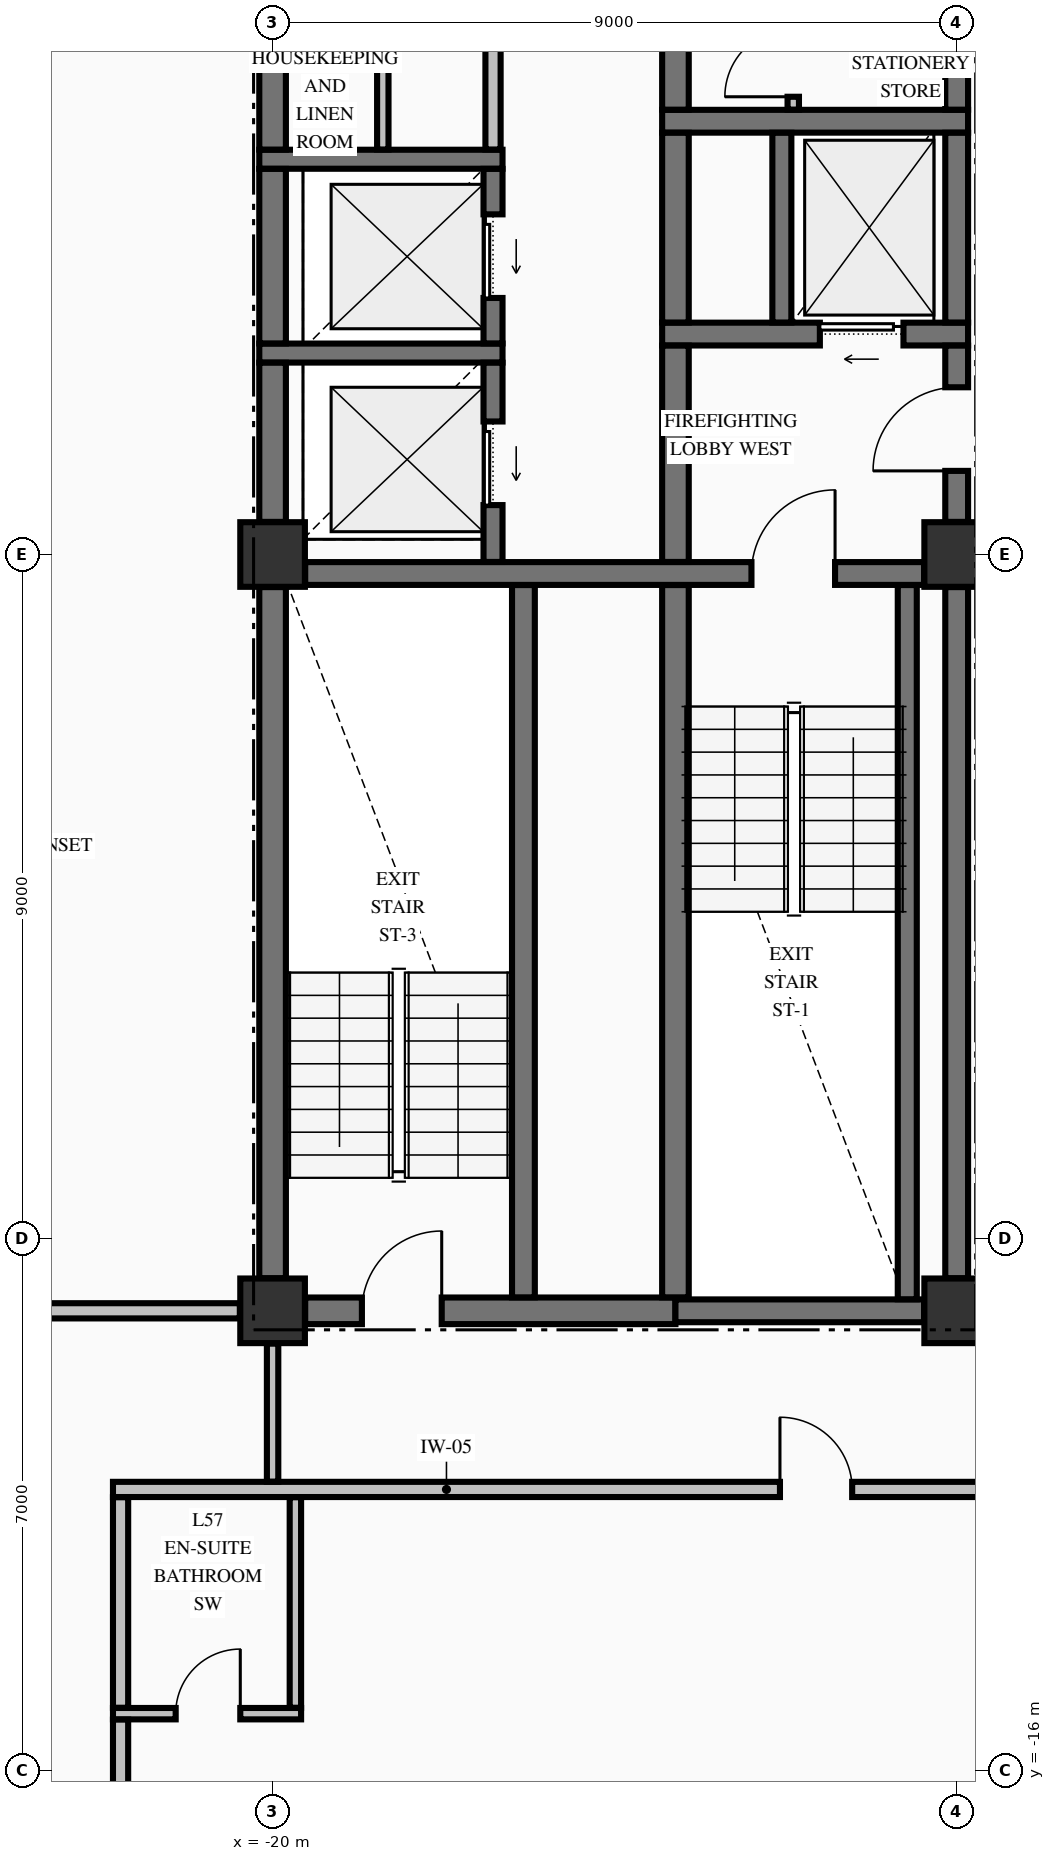
"""IFC4 building model, lengths in metres.
Left out: names, types, materials, properties, quantities, classifications, styles, units other than length and angle.
Written with IfcOpenShell. Run it as: python <this file> out.ifc"""

import sys

from ifc_helpers import new_model, si_unit, direction, frame, frame_2d, origin, origin_2d, place, context, subcontext, project, spatial, rectangle, extrude, element, fill, save


model = new_model("IFC4")
c1 = context("Model", 3, precision=1e-05, world=origin(), true_north=direction((0.0, 1.0)))
c2 = subcontext(c1, "Body", "Model", "MODEL_VIEW")
j1 = project(units=[si_unit("LENGTHUNIT", "METRE"), si_unit("PLANEANGLEUNIT", "RADIAN")], contexts=[c1])
p1 = place(None, origin())
s1 = spatial("IfcSite", under=j1, at=p1, CompositionType="ELEMENT")
p2 = place(p1, origin())
s2 = spatial("IfcBuilding", under=s1, at=p2, CompositionType="ELEMENT")
p3 = place(p2, frame((0.0, 0.0, 218.66)))
s3 = spatial("IfcBuildingStorey", under=s2, at=p3, CompositionType="ELEMENT", Elevation=218.66)
for number, where, z_axis, x_axis in (
    (1, (-20.0, -9.95, -0.25), (0.0, 0.0, 1.0), (1.0, 0.0, 0.0)),
    (2, (-11.0, -9.95, -0.25), (0.0, 0.0, 1.0), (1.0, 0.0, 0.0)),
    (3, (-11.0, 0.0, -0.25), (0.0, 0.0, 1.0), (1.0, 0.0, 0.0)),
    (4, (-20.0, 0.0, -0.25), (0.0, 0.0, 1.0), (1.0, 0.0, 0.0)),
):
    element("IfcColumn", number, at=place(p3, frame(where, z_axis=z_axis, x_axis=x_axis)), inside=s3, PredefinedType="COLUMN", context=c2, shape_type="SweptSolid", body=[
        extrude(rectangle(XDim=0.85, YDim=0.85, at=origin_2d()), origin(), (0.0, 0.0, 1.0), 3.225),
    ])
p4 = place(p3, frame((-19.571, -9.95, 0.0), z_axis=(0.0, 0.0, 1.0), x_axis=(1.0, 0.0, 0.0)))
e5 = element("IfcWall", 5, at=p4, inside=s3, PredefinedType="SHEAR", context=c2, shape_type="SweptSolid", body=[
    extrude(rectangle(XDim=4.871, YDim=0.35, at=frame_2d((2.436, 0.0))), origin(), (0.0, 0.0, 1.0), 2.975),
])
p5 = place(p4, frame((0.746, 0.0, 0.0)))
e6 = element("IfcOpeningElement", 6, at=p5, cuts=e5, PredefinedType="OPENING", context=c2, shape_type="SweptSolid", body=[
    extrude(rectangle(XDim=1.05, YDim=2.15, at=frame_2d((0.525, 1.075))), frame((0.0, 0.185, 0.0), z_axis=(0.0, -1.0, 0.0), x_axis=(1.0, 0.0, 0.0)), (0.0, 0.0, 1.0), 0.37),
])
p6 = place(p3, frame((-14.7, -9.95, 0.0), z_axis=(0.0, 0.0, 1.0), x_axis=(1.0, 0.0, 0.0)))
e7 = element("IfcWall", 7, at=p6, inside=s3, PredefinedType="SHEAR", context=c2, shape_type="SweptSolid", body=[
    extrude(rectangle(XDim=3.271, YDim=0.3, at=frame_2d((1.635, 0.0))), origin(), (0.0, 0.0, 1.0), 2.975),
])
p7 = place(p3, frame((-19.571, -0.25, 0.0), z_axis=(0.0, 0.0, 1.0), x_axis=(1.0, 0.0, 0.0)))
e8 = element("IfcWall", 8, at=p7, inside=s3, PredefinedType="SHEAR", context=c2, shape_type="SweptSolid", body=[
    extrude(rectangle(XDim=8.142, YDim=0.3, at=frame_2d((4.071, 0.0))), origin(), (0.0, 0.0, 1.0), 2.975),
])
p8 = place(p7, frame((5.871, 0.0, 0.0)))
e9 = element("IfcOpeningElement", 9, at=p8, cuts=e8, PredefinedType="OPENING", context=c2, shape_type="SweptSolid", body=[
    extrude(rectangle(XDim=1.1, YDim=2.15, at=frame_2d((0.55, 1.075))), frame((0.0, 0.16, 0.0), z_axis=(0.0, -1.0, 0.0), x_axis=(1.0, 0.0, 0.0)), (0.0, 0.0, 1.0), 0.32),
])
p9 = place(p3, frame((-20.175, 2.65, 0.0), z_axis=(0.0, 0.0, 1.0), x_axis=(1.0, 0.0, 0.0)))
e10 = element("IfcWall", 10, at=p9, inside=s3, PredefinedType="SOLIDWALL", context=c2, shape_type="SweptSolid", body=[
    extrude(rectangle(XDim=3.2, YDim=0.25, at=frame_2d((1.6, 0.0))), origin(), (0.0, 0.0, 1.0), 2.975),
])
p10 = place(p3, frame((-14.875, 2.9, 0.0), z_axis=(0.0, 0.0, 1.0), x_axis=(1.0, 0.0, 0.0)))
e11 = element("IfcWall", 11, at=p10, inside=s3, PredefinedType="SHEAR", context=c2, shape_type="SweptSolid", body=[
    extrude(rectangle(XDim=4.025, YDim=0.3, at=frame_2d((2.012, 0.0))), origin(), (0.0, 0.0, 1.0), 2.975),
])
p11 = place(p10, frame((2.075, 0.0, 0.0)))
e12 = element("IfcOpeningElement", 12, at=p11, cuts=e11, PredefinedType="OPENING", context=c2, shape_type="SweptSolid", body=[
    extrude(rectangle(XDim=1.1, YDim=2.2, at=frame_2d((0.55, 1.1))), frame((0.0, 0.16, 0.0), z_axis=(0.0, -1.0, 0.0), x_axis=(1.0, 0.0, 0.0)), (0.0, 0.0, 1.0), 0.32),
])
p12 = place(p3, frame((-20.175, 5.2, 0.0), z_axis=(0.0, 0.0, 1.0), x_axis=(1.0, 0.0, 0.0)))
e13 = element("IfcWall", 13, at=p12, inside=s3, PredefinedType="SOLIDWALL", context=c2, shape_type="SweptSolid", body=[
    extrude(rectangle(XDim=3.2, YDim=0.25, at=frame_2d((1.6, 0.0))), origin(), (0.0, 0.0, 1.0), 2.975),
])
p13 = place(p3, frame((-14.875, 5.7, 0.0), z_axis=(0.0, 0.0, 1.0), x_axis=(1.0, 0.0, 0.0)))
e14 = element("IfcWall", 14, at=p13, inside=s3, PredefinedType="SHEAR", context=c2, shape_type="SweptSolid", body=[
    extrude(rectangle(XDim=4.025, YDim=0.3, at=frame_2d((2.012, 0.0))), origin(), (0.0, 0.0, 1.0), 2.975),
])
p14 = place(p3, frame((-22.1, -15.25, 0.0), z_axis=(0.0, 0.0, 1.0), x_axis=(1.0, 0.0, 0.0)))
e15 = element("IfcWall", 15, at=p14, inside=s3, PredefinedType="PARTITIONING", context=c2, shape_type="SweptSolid", body=[
    extrude(rectangle(XDim=2.475, YDim=0.15, at=frame_2d((1.238, 0.0))), origin(), (0.0, 0.0, 1.0), 2.975),
])
p15 = place(p14, frame((0.825, 0.0, 0.0)))
e16 = element("IfcOpeningElement", 16, at=p15, cuts=e15, PredefinedType="OPENING", context=c2, shape_type="SweptSolid", body=[
    extrude(rectangle(XDim=0.85, YDim=2.1, at=frame_2d((0.425, 1.05))), frame((0.0, 0.085, 0.0), z_axis=(0.0, -1.0, 0.0), x_axis=(1.0, 0.0, 0.0)), (0.0, 0.0, 1.0), 0.17),
])
p16 = place(p3, frame((-22.1, -12.3, 0.0), z_axis=(0.0, 0.0, 1.0), x_axis=(1.0, 0.0, 0.0)))
e17 = element("IfcWall", 17, at=p16, inside=s3, PredefinedType="PARTITIONING", context=c2, shape_type="SweptSolid", body=[
    extrude(rectangle(XDim=16.2, YDim=0.2, at=frame_2d((8.1, 0.0))), origin(), (0.0, 0.0, 1.0), 2.975),
])
p17 = place(p16, frame((8.775, 0.0, 0.0)))
e18 = element("IfcOpeningElement", 18, at=p17, cuts=e17, PredefinedType="OPENING", context=c2, shape_type="SweptSolid", body=[
    extrude(rectangle(XDim=0.95, YDim=2.15, at=frame_2d((0.475, 1.075))), frame((0.0, 0.11, 0.0), z_axis=(0.0, -1.0, 0.0), x_axis=(1.0, 0.0, 0.0)), (0.0, 0.0, 1.0), 0.22),
])
p18 = place(p3, frame((-26.835, -9.95, 0.0), z_axis=(0.0, 0.0, 1.0), x_axis=(1.0, 0.0, 0.0)))
e19 = element("IfcWall", 19, at=p18, inside=s3, PredefinedType="PARTITIONING", context=c2, shape_type="SweptSolid", body=[
    extrude(rectangle(XDim=6.404, YDim=0.2, at=frame_2d((3.202, 0.0))), origin(), (0.0, 0.0, 1.0), 2.975),
])
p19 = place(p3, frame((-20.0, -9.521, 0.0), z_axis=(0.0, 0.0, 1.0), x_axis=(0.0, 1.0, 0.0)))
e20 = element("IfcWall", 20, at=p19, inside=s3, PredefinedType="SHEAR", context=c2, shape_type="SweptSolid", body=[
    extrude(rectangle(XDim=9.092, YDim=0.35, at=frame_2d((4.546, 0.0))), origin(), (0.0, 0.0, 1.0), 2.975),
])
p20 = place(p3, frame((-20.0, 0.429, 0.0), z_axis=(0.0, 0.0, 1.0), x_axis=(0.0, 1.0, 0.0)))
e21 = element("IfcWall", 21, at=p20, inside=s3, PredefinedType="SHEAR", context=c2, shape_type="SweptSolid", body=[
    extrude(rectangle(XDim=2.094, YDim=0.35, at=frame_2d((1.047, 0.0))), origin(), (0.0, 0.0, 1.0), 2.975),
])
p21 = place(p3, frame((-20.0, 2.777, 0.0), z_axis=(0.0, 0.0, 1.0), x_axis=(0.0, 1.0, 0.0)))
e22 = element("IfcWall", 22, at=p21, inside=s3, PredefinedType="SHEAR", context=c2, shape_type="SweptSolid", body=[
    extrude(rectangle(XDim=2.296, YDim=0.35, at=frame_2d((1.148, 0.0))), origin(), (0.0, 0.0, 1.0), 2.975),
])
p22 = place(p3, frame((-20.0, 5.327, 0.0), z_axis=(0.0, 0.0, 1.0), x_axis=(0.0, 1.0, 0.0)))
e23 = element("IfcWall", 23, at=p22, inside=s3, PredefinedType="SHEAR", context=c2, shape_type="SweptSolid", body=[
    extrude(rectangle(XDim=4.744, YDim=0.35, at=frame_2d((2.372, 0.0))), origin(), (0.0, 0.0, 1.0), 2.975),
])
p23 = place(p3, frame((-17.1, -0.098, 0.0), z_axis=(0.0, 0.0, 1.0), x_axis=(0.0, 1.0, 0.0)))
e24 = element("IfcWall", 24, at=p23, inside=s3, PredefinedType="SOLIDWALL", context=c2, shape_type="SweptSolid", body=[
    extrude(rectangle(XDim=2.621, YDim=0.25, at=frame_2d((1.311, 0.0))), origin(), (0.0, 0.0, 1.0), 2.975),
])
p24 = place(p23, frame((0.748, 0.0, 0.0)))
e25 = element("IfcOpeningElement", 25, at=p24, cuts=e24, PredefinedType="OPENING", context=c2, shape_type="SweptSolid", body=[
    extrude(rectangle(XDim=1.1, YDim=2.2, at=frame_2d((0.55, 1.1))), frame((0.0, 0.135, 0.0), z_axis=(0.0, -1.0, 0.0), x_axis=(1.0, 0.0, 0.0)), (0.0, 0.0, 1.0), 0.27),
])
p25 = place(p3, frame((-17.1, 2.777, 0.0), z_axis=(0.0, 0.0, 1.0), x_axis=(0.0, 1.0, 0.0)))
e26 = element("IfcWall", 26, at=p25, inside=s3, PredefinedType="SOLIDWALL", context=c2, shape_type="SweptSolid", body=[
    extrude(rectangle(XDim=2.296, YDim=0.25, at=frame_2d((1.148, 0.0))), origin(), (0.0, 0.0, 1.0), 2.975),
])
p26 = place(p25, frame((0.598, 0.0, 0.0)))
e27 = element("IfcOpeningElement", 27, at=p26, cuts=e26, PredefinedType="OPENING", context=c2, shape_type="SweptSolid", body=[
    extrude(rectangle(XDim=1.1, YDim=2.2, at=frame_2d((0.55, 1.1))), frame((0.0, 0.135, 0.0), z_axis=(0.0, -1.0, 0.0), x_axis=(1.0, 0.0, 0.0)), (0.0, 0.0, 1.0), 0.27),
])
p27 = place(p3, frame((-16.7, -9.773, 0.0), z_axis=(0.0, 0.0, 1.0), x_axis=(0.0, 1.0, 0.0)))
e28 = element("IfcWall", 28, at=p27, inside=s3, PredefinedType="SHEAR", context=c2, shape_type="SweptSolid", body=[
    extrude(rectangle(XDim=9.371, YDim=0.3, at=frame_2d((4.686, 0.0))), origin(), (0.0, 0.0, 1.0), 2.975),
])
p28 = place(p3, frame((-14.7, -9.773, 0.0), z_axis=(0.0, 0.0, 1.0), x_axis=(0.0, 1.0, 0.0)))
e29 = element("IfcWall", 29, at=p28, inside=s3, PredefinedType="SHEAR", context=c2, shape_type="SweptSolid", body=[
    extrude(rectangle(XDim=9.371, YDim=0.35, at=frame_2d((4.686, 0.0))), origin(), (0.0, 0.0, 1.0), 2.975),
])
p29 = place(p3, frame((-14.7, -0.098, 0.0), z_axis=(0.0, 0.0, 1.0), x_axis=(0.0, 1.0, 0.0)))
e30 = element("IfcWall", 30, at=p29, inside=s3, PredefinedType="SHEAR", context=c2, shape_type="SweptSolid", body=[
    extrude(rectangle(XDim=2.846, YDim=0.35, at=frame_2d((1.423, 0.0))), origin(), (0.0, 0.0, 1.0), 2.975),
])
p30 = place(p3, frame((-14.7, 3.052, 0.0), z_axis=(0.0, 0.0, 1.0), x_axis=(0.0, 1.0, 0.0)))
e31 = element("IfcWall", 31, at=p30, inside=s3, PredefinedType="SHEAR", context=c2, shape_type="SweptSolid", body=[
    extrude(rectangle(XDim=2.496, YDim=0.35, at=frame_2d((1.248, 0.0))), origin(), (0.0, 0.0, 1.0), 2.975),
])
p31 = place(p3, frame((-14.7, 5.852, 0.0), z_axis=(0.0, 0.0, 1.0), x_axis=(0.0, 1.0, 0.0)))
e32 = element("IfcWall", 32, at=p31, inside=s3, PredefinedType="SHEAR", context=c2, shape_type="SweptSolid", body=[
    extrude(rectangle(XDim=4.471, YDim=0.35, at=frame_2d((2.235, 0.0))), origin(), (0.0, 0.0, 1.0), 2.975),
])
p32 = place(p3, frame((-13.3, 3.052, 0.0), z_axis=(0.0, 0.0, 1.0), x_axis=(0.0, 1.0, 0.0)))
e33 = element("IfcWall", 33, at=p32, inside=s3, PredefinedType="SOLIDWALL", context=c2, shape_type="SweptSolid", body=[
    extrude(rectangle(XDim=2.496, YDim=0.25, at=frame_2d((1.248, 0.0))), origin(), (0.0, 0.0, 1.0), 2.975),
])
p33 = place(p3, frame((-11.65, -9.798, 0.0), z_axis=(0.0, 0.0, 1.0), x_axis=(0.0, 1.0, 0.0)))
e34 = element("IfcWall", 34, at=p33, inside=s3, PredefinedType="SOLIDWALL", context=c2, shape_type="SweptSolid", body=[
    extrude(rectangle(XDim=9.396, YDim=0.25, at=frame_2d((4.698, 0.0))), origin(), (0.0, 0.0, 1.0), 2.975),
])
p34 = place(p3, frame((-11.0, -9.521, 0.0), z_axis=(0.0, 0.0, 1.0), x_axis=(0.0, 1.0, 0.0)))
e35 = element("IfcWall", 35, at=p34, inside=s3, PredefinedType="SHEAR", context=c2, shape_type="SweptSolid", body=[
    extrude(rectangle(XDim=9.092, YDim=0.3, at=frame_2d((4.546, 0.0))), origin(), (0.0, 0.0, 1.0), 2.975),
])
p35 = place(p3, frame((-11.0, 0.429, 0.0), z_axis=(0.0, 0.0, 1.0), x_axis=(0.0, 1.0, 0.0)))
e36 = element("IfcWall", 36, at=p35, inside=s3, PredefinedType="SHEAR", context=c2, shape_type="SweptSolid", body=[
    extrude(rectangle(XDim=2.319, YDim=0.3, at=frame_2d((1.16, 0.0))), origin(), (0.0, 0.0, 1.0), 2.975),
])
p36 = place(p35, frame((0.671, 0.0, 0.0)))
e37 = element("IfcOpeningElement", 37, at=p36, cuts=e36, PredefinedType="OPENING", context=c2, shape_type="SweptSolid", body=[
    extrude(rectangle(XDim=1.1, YDim=2.15, at=frame_2d((0.55, 1.075))), frame((0.0, 0.16, 0.0), z_axis=(0.0, -1.0, 0.0), x_axis=(1.0, 0.0, 0.0)), (0.0, 0.0, 1.0), 0.32),
])
p37 = place(p3, frame((-11.0, 3.052, 0.0), z_axis=(0.0, 0.0, 1.0), x_axis=(0.0, 1.0, 0.0)))
e38 = element("IfcWall", 38, at=p37, inside=s3, PredefinedType="SHEAR", context=c2, shape_type="SweptSolid", body=[
    extrude(rectangle(XDim=2.496, YDim=0.3, at=frame_2d((1.248, 0.0))), origin(), (0.0, 0.0, 1.0), 2.975),
])
p38 = place(p3, frame((-11.0, 5.852, 0.0), z_axis=(0.0, 0.0, 1.0), x_axis=(0.0, 1.0, 0.0)))
e39 = element("IfcWall", 39, at=p38, inside=s3, PredefinedType="SHEAR", context=c2, shape_type="SweptSolid", body=[
    extrude(rectangle(XDim=4.219, YDim=0.3, at=frame_2d((2.109, 0.0))), origin(), (0.0, 0.0, 1.0), 2.975),
])
p39 = place(p3, frame((-22.0, -18.994, 0.0), z_axis=(0.0, 0.0, 1.0), x_axis=(0.0, 1.0, 0.0)))
e40 = element("IfcWall", 40, at=p39, inside=s3, PredefinedType="PARTITIONING", context=c2, shape_type="SweptSolid", body=[
    extrude(rectangle(XDim=3.666, YDim=0.2, at=frame_2d((1.833, 0.0))), origin(), (0.0, 0.0, 1.0), 2.975),
])
p40 = place(p3, frame((-22.0, -15.172, 0.0), z_axis=(0.0, 0.0, 1.0), x_axis=(0.0, 1.0, 0.0)))
e41 = element("IfcWall", 41, at=p40, inside=s3, PredefinedType="PARTITIONING", context=c2, shape_type="SweptSolid", body=[
    extrude(rectangle(XDim=2.769, YDim=0.2, at=frame_2d((1.385, 0.0))), origin(), (0.0, 0.0, 1.0), 2.975),
])
p41 = place(p3, frame((-20.0, -12.197, 0.0), z_axis=(0.0, 0.0, 1.0), x_axis=(0.0, 1.0, 0.0)))
e42 = element("IfcWall", 42, at=p41, inside=s3, PredefinedType="PARTITIONING", context=c2, shape_type="SweptSolid", body=[
    extrude(rectangle(XDim=1.816, YDim=0.15, at=frame_2d((0.908, 0.0))), origin(), (0.0, 0.0, 1.0), 2.167),
])
p42 = place(p3, frame((-19.7, -15.172, 0.0), z_axis=(0.0, 0.0, 1.0), x_axis=(0.0, 1.0, 0.0)))
e43 = element("IfcWall", 43, at=p42, inside=s3, PredefinedType="PARTITIONING", context=c2, shape_type="SweptSolid", body=[
    extrude(rectangle(XDim=2.769, YDim=0.15, at=frame_2d((1.385, 0.0))), origin(), (0.0, 0.0, 1.0), 2.167),
])
p43 = place(p3, frame((-18.55, 5.328, 0.0), z_axis=(0.0, 0.0, 1.0), x_axis=(0.0, 1.0, 0.0)))
e44 = element("IfcWall", 44, at=p43, inside=s3, PredefinedType="PARTITIONING", context=c2, shape_type="SweptSolid", body=[
    extrude(rectangle(XDim=4.994, YDim=0.15, at=frame_2d((2.497, 0.0))), origin(), (0.0, 0.0, 1.0), 2.975),
])
p44 = place(p43, frame((2.047, 0.0, 0.0)))
e45 = element("IfcOpeningElement", 45, at=p44, cuts=e44, PredefinedType="OPENING", context=c2, shape_type="SweptSolid", body=[
    extrude(rectangle(XDim=0.95, YDim=2.15, at=frame_2d((0.475, 1.075))), frame((0.0, 0.085, 0.0), z_axis=(0.0, -1.0, 0.0), x_axis=(1.0, 0.0, 0.0)), (0.0, 0.0, 1.0), 0.17),
])
p45 = place(p3, frame((-17.1, 5.328, 0.0), z_axis=(0.0, 0.0, 1.0), x_axis=(0.0, 1.0, 0.0)))
e46 = element("IfcWall", 46, at=p45, inside=s3, PredefinedType="PARTITIONING", context=c2, shape_type="SweptSolid", body=[
    extrude(rectangle(XDim=4.994, YDim=0.2, at=frame_2d((2.497, 0.0))), origin(), (0.0, 0.0, 1.0), 2.975),
])
p46 = place(p3, frame((-13.15, 5.853, 0.0), z_axis=(0.0, 0.0, 1.0), x_axis=(0.0, 1.0, 0.0)))
e47 = element("IfcWall", 47, at=p46, inside=s3, PredefinedType="PARTITIONING", context=c2, shape_type="SweptSolid", body=[
    extrude(rectangle(XDim=1.219, YDim=0.15, at=frame_2d((0.609, 0.0))), origin(), (0.0, 0.0, 1.0), 2.975),
])
p47 = place(p46, frame((0.169, 0.0, 0.0)))
e48 = element("IfcOpeningElement", 48, at=p47, cuts=e47, PredefinedType="OPENING", context=c2, shape_type="SweptSolid", body=[
    extrude(rectangle(XDim=0.9, YDim=2.15, at=frame_2d((0.45, 1.075))), frame((0.0, 0.085, 0.0), z_axis=(0.0, -1.0, 0.0), x_axis=(1.0, 0.0, 0.0)), (0.0, 0.0, 1.0), 0.17),
])
p48 = place(p8, origin())
e49 = element("IfcDoor", 49, at=p48, inside=s3, OperationType="SINGLE_SWING_RIGHT", PredefinedType="DOOR", context=c2, shape_type="SweptSolid", body=[
    extrude(rectangle(XDim=1.1, YDim=2.15, at=frame_2d((0.55, 1.075))), frame((0.0, 0.025, 0.0), z_axis=(0.0, -1.0, 0.0), x_axis=(1.0, 0.0, 0.0)), (0.0, 0.0, 1.0), 0.05),
])
fill(e9, e49)
p49 = place(p36, origin())
e50 = element("IfcDoor", 50, at=p49, inside=s3, OperationType="SINGLE_SWING_LEFT", PredefinedType="DOOR", context=c2, shape_type="SweptSolid", body=[
    extrude(rectangle(XDim=1.1, YDim=2.15, at=frame_2d((0.55, 1.075))), frame((0.0, 0.025, 0.0), z_axis=(0.0, -1.0, 0.0), x_axis=(1.0, 0.0, 0.0)), (0.0, 0.0, 1.0), 0.05),
])
fill(e37, e50)
p50 = place(p11, origin())
e51 = element("IfcDoor", 51, at=p50, inside=s3, OperationType="SLIDING_TO_LEFT", PredefinedType="DOOR", context=c2, shape_type="SweptSolid", body=[
    extrude(rectangle(XDim=1.1, YDim=2.2, at=frame_2d((0.55, 1.1))), frame((0.0, 0.025, 0.0), z_axis=(0.0, -1.0, 0.0), x_axis=(1.0, 0.0, 0.0)), (0.0, 0.0, 1.0), 0.05),
])
fill(e12, e51)
p51 = place(p47, origin())
e52 = element("IfcDoor", 52, at=p51, inside=s3, OperationType="SINGLE_SWING_LEFT", PredefinedType="DOOR", context=c2, shape_type="SweptSolid", body=[
    extrude(rectangle(XDim=0.9, YDim=2.15, at=frame_2d((0.45, 1.075))), frame((0.0, 0.025, 0.0), z_axis=(0.0, -1.0, 0.0), x_axis=(1.0, 0.0, 0.0)), (0.0, 0.0, 1.0), 0.05),
])
fill(e48, e52)
p52 = place(p5, origin())
e53 = element("IfcDoor", 53, at=p52, inside=s3, OperationType="SINGLE_SWING_RIGHT", PredefinedType="DOOR", context=c2, shape_type="SweptSolid", body=[
    extrude(rectangle(XDim=1.05, YDim=2.15, at=frame_2d((0.525, 1.075))), frame((0.0, 0.025, 0.0), z_axis=(0.0, -1.0, 0.0), x_axis=(1.0, 0.0, 0.0)), (0.0, 0.0, 1.0), 0.05),
])
fill(e6, e53)
p53 = place(p24, origin())
e54 = element("IfcDoor", 54, at=p53, inside=s3, OperationType="SLIDING_TO_LEFT", PredefinedType="DOOR", context=c2, shape_type="SweptSolid", body=[
    extrude(rectangle(XDim=1.1, YDim=2.2, at=frame_2d((0.55, 1.1))), frame((0.0, 0.025, 0.0), z_axis=(0.0, -1.0, 0.0), x_axis=(1.0, 0.0, 0.0)), (0.0, 0.0, 1.0), 0.05),
])
fill(e25, e54)
p54 = place(p26, origin())
e55 = element("IfcDoor", 55, at=p54, inside=s3, OperationType="SLIDING_TO_LEFT", PredefinedType="DOOR", context=c2, shape_type="SweptSolid", body=[
    extrude(rectangle(XDim=1.1, YDim=2.2, at=frame_2d((0.55, 1.1))), frame((0.0, 0.025, 0.0), z_axis=(0.0, -1.0, 0.0), x_axis=(1.0, 0.0, 0.0)), (0.0, 0.0, 1.0), 0.05),
])
fill(e27, e55)
p55 = place(p17, origin())
e56 = element("IfcDoor", 56, at=p55, inside=s3, OperationType="SINGLE_SWING_LEFT", PredefinedType="DOOR", context=c2, shape_type="SweptSolid", body=[
    extrude(rectangle(XDim=0.95, YDim=2.15, at=frame_2d((0.475, 1.075))), frame((0.0, 0.025, 0.0), z_axis=(0.0, -1.0, 0.0), x_axis=(1.0, 0.0, 0.0)), (0.0, 0.0, 1.0), 0.05),
])
fill(e18, e56)
p56 = place(p15, origin())
e57 = element("IfcDoor", 57, at=p56, inside=s3, OperationType="SINGLE_SWING_RIGHT", PredefinedType="DOOR", context=c2, shape_type="SweptSolid", body=[
    extrude(rectangle(XDim=0.85, YDim=2.1, at=frame_2d((0.425, 1.05))), frame((0.0, 0.025, 0.0), z_axis=(0.0, -1.0, 0.0), x_axis=(1.0, 0.0, 0.0)), (0.0, 0.0, 1.0), 0.05),
])
fill(e16, e57)
save(model, sys.argv[1])
